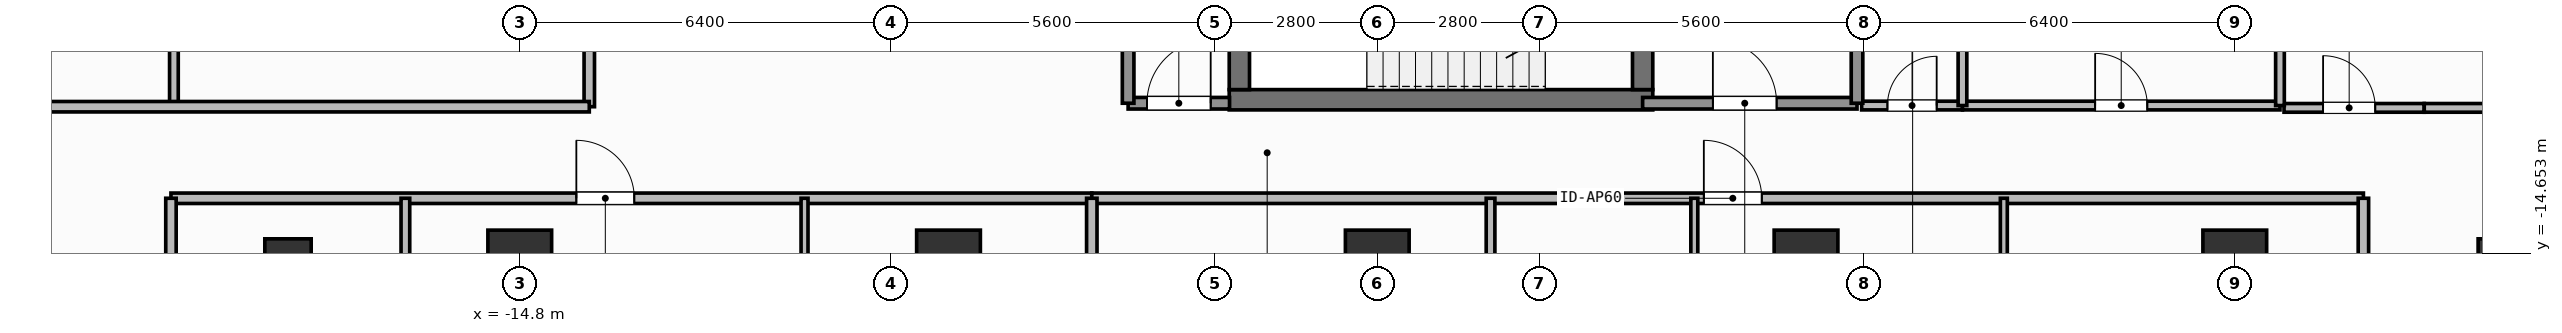
"""IFC4 building model, lengths in metres.
Left out: names, types, materials, properties, quantities, classifications, styles, units other than length and angle.
Written with IfcOpenShell. Run it as: python <this file> out.ifc"""

import sys

from ifc_helpers import new_model, si_unit, direction, frame, frame_2d, origin, origin_2d, place, context, subcontext, project, spatial, rectangle, hollow_rectangle, extrude, element, fill, save


model = new_model("IFC4")
c1 = context("Model", 3, precision=1e-05, world=origin(), true_north=direction((0.0, 1.0)))
c2 = subcontext(c1, "Body", "Model", "MODEL_VIEW")
j1 = project(units=[si_unit("LENGTHUNIT", "METRE"), si_unit("PLANEANGLEUNIT", "RADIAN")], contexts=[c1])
p1 = place(None, origin())
s1 = spatial("IfcSite", under=j1, at=p1, CompositionType="ELEMENT")
p2 = place(p1, origin())
s2 = spatial("IfcBuilding", under=s1, at=p2, CompositionType="ELEMENT")
p3 = place(p2, frame((0.0, 0.0, 195.3)))
s3 = spatial("IfcBuildingStorey", under=s2, at=p3, CompositionType="ELEMENT", Elevation=195.3)
p4 = place(p3, frame((-2.555, -12.0, 0.0), z_axis=(0.0, 0.0, 1.0), x_axis=(1.0, 0.0, 0.0)))
e1 = element("IfcWall", 1, at=p4, inside=s3, PredefinedType="SHEAR", context=c2, shape_type="SweptSolid", body=[
    extrude(rectangle(XDim=7.31, YDim=0.35, at=frame_2d((3.655, 0.0))), origin(), (0.0, 0.0, 1.0), 3.9),
])
p5 = place(p3, frame((-2.38, -11.825, 0.0), z_axis=(0.0, 0.0, 1.0), x_axis=(0.0, 1.0, 0.0)))
e2 = element("IfcWall", 2, at=p5, inside=s3, PredefinedType="SHEAR", context=c2, shape_type="SweptSolid", body=[
    extrude(rectangle(XDim=2.925, YDim=0.35, at=frame_2d((1.462, 0.0))), origin(), (0.0, 0.0, 1.0), 3.9),
])
p6 = place(p3, frame((4.58, -8.9, 0.0), z_axis=(0.0, 0.0, 1.0), x_axis=(0.0, -1.0, 0.0)))
e3 = element("IfcWall", 3, at=p6, inside=s3, PredefinedType="SHEAR", context=c2, shape_type="SweptSolid", body=[
    extrude(rectangle(XDim=2.925, YDim=0.35, at=frame_2d((1.462, 0.0))), origin(), (0.0, 0.0, 1.0), 3.9),
])
p7 = place(p6, frame((0.913, 0.0, 0.0)))
e4 = element("IfcOpeningElement", 4, at=p7, cuts=e3, PredefinedType="OPENING", context=c2, shape_type="SweptSolid", body=[
    extrude(rectangle(XDim=1.1, YDim=2.15, at=frame_2d((0.55, 1.075))), frame((0.0, 0.185, 0.0), z_axis=(0.0, -1.0, 0.0), x_axis=(1.0, 0.0, 0.0)), (0.0, 0.0, 1.0), 0.37),
])
for number, where, z_axis, x_axis in (
    (5, (-14.8, -14.8, 0.0), (0.0, 0.0, 1.0), (1.0, 0.0, 0.0)),
    (6, (-7.4, -14.8, 0.0), (0.0, 0.0, 1.0), (1.0, 0.0, 0.0)),
    (7, (0.0, -14.8, 0.0), (0.0, 0.0, 1.0), (1.0, 0.0, 0.0)),
    (8, (7.4, -14.8, 0.0), (0.0, 0.0, 1.0), (1.0, 0.0, 0.0)),
    (9, (14.8, -14.8, 0.0), (0.0, 0.0, 1.0), (1.0, 0.0, 0.0)),
):
    element("IfcColumn", number, at=place(p3, frame(where, z_axis=z_axis, x_axis=x_axis)), inside=s3, PredefinedType="COLUMN", context=c2, shape_type="SweptSolid", body=[
        extrude(rectangle(XDim=1.1, YDim=1.1, at=origin_2d()), origin(), (0.0, 0.0, 1.0), 3.9),
    ])
for number, where, z_axis, x_axis in (
    (10, (-18.8, -14.8, 0.0), (0.0, 0.0, 1.0), (1.0, 0.0, 0.0)),
    (11, (19.4, -14.8, 0.0), (0.0, 0.0, 1.0), (1.0, 0.0, 0.0)),
):
    element("IfcColumn", number, at=place(p3, frame(where, z_axis=z_axis, x_axis=x_axis)), inside=s3, PredefinedType="COLUMN", context=c2, shape_type="SweptSolid", body=[
        extrude(hollow_rectangle(XDim=0.8, YDim=0.8, WallThickness=0.036, at=origin_2d()), origin(), (0.0, 0.0, 1.0), 3.9),
    ])
p8 = place(p3, frame((4.58, -12.06, 0.0), z_axis=(0.0, 0.0, 1.0), x_axis=(1.0, 0.0, 0.0)))
e12 = element("IfcWall", 12, at=p8, inside=s3, PredefinedType="SOLIDWALL", context=c2, shape_type="SweptSolid", body=[
    extrude(rectangle(XDim=3.7, YDim=0.2, at=frame_2d((1.85, 0.0))), origin(), (0.0, 0.0, 1.0), 3.68),
])
p9 = place(p8, frame((1.212, 0.0, 0.0)))
e13 = element("IfcOpeningElement", 13, at=p9, cuts=e12, PredefinedType="OPENING", context=c2, shape_type="SweptSolid", body=[
    extrude(rectangle(XDim=1.1, YDim=2.15, at=frame_2d((0.55, 1.075))), frame((0.0, 0.11, 0.0), z_axis=(0.0, -1.0, 0.0), x_axis=(1.0, 0.0, 0.0)), (0.0, 0.0, 1.0), 0.22),
])
p10 = place(p3, frame((-4.3, -12.06, 0.0), z_axis=(0.0, 0.0, 1.0), x_axis=(1.0, 0.0, 0.0)))
e14 = element("IfcWall", 14, at=p10, inside=s3, PredefinedType="SOLIDWALL", context=c2, shape_type="SweptSolid", body=[
    extrude(rectangle(XDim=1.75, YDim=0.2, at=frame_2d((0.875, 0.0))), origin(), (0.0, 0.0, 1.0), 3.68),
])
p11 = place(p10, frame((0.325, 0.0, 0.0)))
e15 = element("IfcOpeningElement", 15, at=p11, cuts=e14, PredefinedType="OPENING", context=c2, shape_type="SweptSolid", body=[
    extrude(rectangle(XDim=1.1, YDim=2.15, at=frame_2d((0.55, 1.075))), frame((0.0, 0.11, 0.0), z_axis=(0.0, -1.0, 0.0), x_axis=(1.0, 0.0, 0.0)), (0.0, 0.0, 1.0), 0.22),
])
p12 = place(p3, frame((8.36, -12.1, 0.0), z_axis=(0.0, 0.0, 1.0), x_axis=(1.0, 0.0, 0.0)))
e16 = element("IfcWall", 16, at=p12, inside=s3, PredefinedType="PARTITIONING", context=c2, shape_type="SweptSolid", body=[
    extrude(rectangle(XDim=1.74, YDim=0.15, at=frame_2d((0.87, 0.0))), origin(), (0.0, 0.0, 1.0), 3.68),
])
p13 = place(p12, frame((0.445, 0.0, 0.0)))
e17 = element("IfcOpeningElement", 17, at=p13, cuts=e16, PredefinedType="OPENING", context=c2, shape_type="SweptSolid", body=[
    extrude(rectangle(XDim=0.85, YDim=2.1, at=frame_2d((0.425, 1.05))), frame((0.0, 0.085, 0.0), z_axis=(0.0, -1.0, 0.0), x_axis=(1.0, 0.0, 0.0)), (0.0, 0.0, 1.0), 0.17),
])
p14 = place(p3, frame((10.1, -12.1, 0.0), z_axis=(0.0, 0.0, 1.0), x_axis=(1.0, 0.0, 0.0)))
e18 = element("IfcWall", 18, at=p14, inside=s3, PredefinedType="PARTITIONING", context=c2, shape_type="SweptSolid", body=[
    extrude(rectangle(XDim=5.48, YDim=0.15, at=frame_2d((2.74, 0.0))), origin(), (0.0, 0.0, 1.0), 3.68),
])
p15 = place(p14, frame((2.29, 0.0, 0.0)))
e19 = element("IfcOpeningElement", 19, at=p15, cuts=e18, PredefinedType="OPENING", context=c2, shape_type="SweptSolid", body=[
    extrude(rectangle(XDim=0.9, YDim=2.1, at=frame_2d((0.45, 1.05))), frame((0.0, 0.085, 0.0), z_axis=(0.0, -1.0, 0.0), x_axis=(1.0, 0.0, 0.0)), (0.0, 0.0, 1.0), 0.17),
])
p16 = place(p3, frame((-20.82, -13.7, 0.0), z_axis=(0.0, 0.0, 1.0), x_axis=(1.0, 0.0, 0.0)))
e20 = element("IfcWall", 20, at=p16, inside=s3, PredefinedType="PARTITIONING", context=c2, shape_type="SweptSolid", body=[
    extrude(rectangle(XDim=15.893, YDim=0.18, at=frame_2d((7.947, 0.0))), origin(), (0.0, 0.0, 1.0), 3.68),
])
p17 = place(p16, frame((6.997, 0.0, 0.0)))
e21 = element("IfcOpeningElement", 21, at=p17, cuts=e20, PredefinedType="OPENING", context=c2, shape_type="SweptSolid", body=[
    extrude(rectangle(XDim=1.0, YDim=2.2, at=frame_2d((0.5, 1.1))), frame((0.0, 0.1, 0.0), z_axis=(0.0, -1.0, 0.0), x_axis=(1.0, 0.0, 0.0)), (0.0, 0.0, 1.0), 0.2),
])
p18 = place(p3, frame((-16.774, -24.39, 0.0), z_axis=(0.0, 0.0, 1.0), x_axis=(0.0, 1.0, 0.0)))
e22 = element("IfcWall", 22, at=p18, inside=s3, PredefinedType="PARTITIONING", context=c2, shape_type="SweptSolid", body=[
    extrude(rectangle(XDim=10.69, YDim=0.15, at=frame_2d((5.345, 0.0))), origin(), (0.0, 0.0, 1.0), 3.68),
])
p19 = place(p18, frame((4.83, 0.0, 0.0)))
e23 = element("IfcOpeningElement", 23, at=p19, cuts=e22, PredefinedType="OPENING", context=c2, shape_type="SweptSolid", body=[
    extrude(rectangle(XDim=0.85, YDim=2.1, at=frame_2d((0.425, 1.05))), frame((0.0, 0.085, 0.0), z_axis=(0.0, -1.0, 0.0), x_axis=(1.0, 0.0, 0.0)), (0.0, 0.0, 1.0), 0.17),
])
p20 = place(p3, frame((-9.885, -18.19, 0.0), z_axis=(0.0, 0.0, 1.0), x_axis=(0.0, 1.0, 0.0)))
e24 = element("IfcWall", 24, at=p20, inside=s3, PredefinedType="PARTITIONING", context=c2, shape_type="SweptSolid", body=[
    extrude(rectangle(XDim=4.49, YDim=0.12, at=frame_2d((2.245, 0.0))), origin(), (0.0, 0.0, 1.0), 3.68),
])
p21 = place(p20, frame((1.907, 0.0, 0.0)))
e25 = element("IfcOpeningElement", 25, at=p21, cuts=e24, PredefinedType="OPENING", context=c2, shape_type="SweptSolid", body=[
    extrude(rectangle(XDim=0.85, YDim=2.1, at=frame_2d((0.425, 1.05))), frame((0.0, 0.07, 0.0), z_axis=(0.0, -1.0, 0.0), x_axis=(1.0, 0.0, 0.0)), (0.0, 0.0, 1.0), 0.14),
])
p22 = place(p3, frame((-4.927, -13.7, 0.0), z_axis=(0.0, 0.0, 1.0), x_axis=(1.0, 0.0, 0.0)))
e26 = element("IfcWall", 26, at=p22, inside=s3, PredefinedType="PARTITIONING", context=c2, shape_type="SweptSolid", body=[
    extrude(rectangle(XDim=21.947, YDim=0.18, at=frame_2d((10.974, 0.0))), origin(), (0.0, 0.0, 1.0), 3.68),
])
p23 = place(p22, frame((10.563, 0.0, 0.0)))
e27 = element("IfcOpeningElement", 27, at=p23, cuts=e26, PredefinedType="OPENING", context=c2, shape_type="SweptSolid", body=[
    extrude(rectangle(XDim=1.0, YDim=2.2, at=frame_2d((0.5, 1.1))), frame((0.0, 0.1, 0.0), z_axis=(0.0, -1.0, 0.0), x_axis=(1.0, 0.0, 0.0)), (0.0, 0.0, 1.0), 0.2),
])
p24 = place(p3, frame((5.472, -24.39, 0.0), z_axis=(0.0, 0.0, 1.0), x_axis=(0.0, 1.0, 0.0)))
e28 = element("IfcWall", 28, at=p24, inside=s3, PredefinedType="PARTITIONING", context=c2, shape_type="SweptSolid", body=[
    extrude(rectangle(XDim=10.69, YDim=0.12, at=frame_2d((5.345, 0.0))), origin(), (0.0, 0.0, 1.0), 3.68),
])
p25 = place(p24, frame((4.806, 0.0, 0.0)))
e29 = element("IfcOpeningElement", 29, at=p25, cuts=e28, PredefinedType="OPENING", context=c2, shape_type="SweptSolid", body=[
    extrude(rectangle(XDim=0.9, YDim=2.1, at=frame_2d((0.45, 1.05))), frame((0.0, 0.07, 0.0), z_axis=(0.0, -1.0, 0.0), x_axis=(1.0, 0.0, 0.0)), (0.0, 0.0, 1.0), 0.14),
])
p26 = place(p3, frame((1.955, -19.45, 0.0), z_axis=(0.0, 0.0, 1.0), x_axis=(0.0, 1.0, 0.0)))
e30 = element("IfcWall", 30, at=p26, inside=s3, PredefinedType="PARTITIONING", context=c2, shape_type="SweptSolid", body=[
    extrude(rectangle(XDim=5.75, YDim=0.15, at=frame_2d((2.875, 0.0))), origin(), (0.0, 0.0, 1.0), 3.68),
])
p27 = place(p26, frame((2.45, 0.0, 0.0)))
e31 = element("IfcOpeningElement", 31, at=p27, cuts=e30, PredefinedType="OPENING", context=c2, shape_type="SweptSolid", body=[
    extrude(rectangle(XDim=0.85, YDim=2.1, at=frame_2d((0.425, 1.05))), frame((0.0, 0.085, 0.0), z_axis=(0.0, -1.0, 0.0), x_axis=(1.0, 0.0, 0.0)), (0.0, 0.0, 1.0), 0.17),
])
p28 = place(p3, frame((10.814, -18.19, 0.0), z_axis=(0.0, 0.0, 1.0), x_axis=(0.0, 1.0, 0.0)))
e32 = element("IfcWall", 32, at=p28, inside=s3, PredefinedType="PARTITIONING", context=c2, shape_type="SweptSolid", body=[
    extrude(rectangle(XDim=4.49, YDim=0.12, at=frame_2d((2.245, 0.0))), origin(), (0.0, 0.0, 1.0), 3.68),
])
p29 = place(p28, frame((1.907, 0.0, 0.0)))
e33 = element("IfcOpeningElement", 33, at=p29, cuts=e32, PredefinedType="OPENING", context=c2, shape_type="SweptSolid", body=[
    extrude(rectangle(XDim=0.85, YDim=2.1, at=frame_2d((0.425, 1.05))), frame((0.0, 0.07, 0.0), z_axis=(0.0, -1.0, 0.0), x_axis=(1.0, 0.0, 0.0)), (0.0, 0.0, 1.0), 0.14),
])
p30 = place(p3, frame((-13.6, -12.12, 0.0), z_axis=(0.0, 0.0, 1.0), x_axis=(0.0, 1.0, 0.0)))
e34 = element("IfcWall", 34, at=p30, inside=s3, PredefinedType="PARTITIONING", context=c2, shape_type="SweptSolid", body=[
    extrude(rectangle(XDim=12.764, YDim=0.18, at=frame_2d((6.382, 0.0))), origin(), (0.0, 0.0, 1.0), 3.68),
])
p31 = place(p30, frame((5.346, 0.0, 0.0)))
e35 = element("IfcOpeningElement", 35, at=p31, cuts=e34, PredefinedType="OPENING", context=c2, shape_type="SweptSolid", body=[
    extrude(rectangle(XDim=1.0, YDim=2.2, at=frame_2d((0.5, 1.1))), frame((0.0, 0.1, 0.0), z_axis=(0.0, -1.0, 0.0), x_axis=(1.0, 0.0, 0.0)), (0.0, 0.0, 1.0), 0.2),
])
p32 = place(p3, frame((15.65, -12.14, 0.0), z_axis=(0.0, 0.0, 1.0), x_axis=(1.0, 0.0, 0.0)))
e36 = element("IfcWall", 36, at=p32, inside=s3, PredefinedType="PARTITIONING", context=c2, shape_type="SweptSolid", body=[
    extrude(rectangle(XDim=2.42, YDim=0.15, at=frame_2d((1.21, 0.0))), origin(), (0.0, 0.0, 1.0), 3.68),
])
p33 = place(p32, frame((0.674, 0.0, 0.0)))
e37 = element("IfcOpeningElement", 37, at=p33, cuts=e36, PredefinedType="OPENING", context=c2, shape_type="SweptSolid", body=[
    extrude(rectangle(XDim=0.9, YDim=2.1, at=frame_2d((0.45, 1.05))), frame((0.0, 0.085, 0.0), z_axis=(0.0, -1.0, 0.0), x_axis=(1.0, 0.0, 0.0)), (0.0, 0.0, 1.0), 0.17),
])
for number, where, z_axis, x_axis in (
    (38, (8.28, -12.06, 0.0), (0.0, 0.0, 1.0), (0.0, 1.0, 0.0)),
    (39, (-4.3, -12.06, 0.0), (0.0, 0.0, 1.0), (0.0, 1.0, 0.0)),
):
    element("IfcWall", number, at=place(p3, frame(where, z_axis=z_axis, x_axis=x_axis)), inside=s3, PredefinedType="SOLIDWALL", context=c2, shape_type="SweptSolid", body=[
        extrude(rectangle(XDim=3.26, YDim=0.2, at=frame_2d((1.63, 0.0))), origin(), (0.0, 0.0, 1.0), 3.68),
    ])
p34 = place(p3, frame((10.1, -12.1, 0.0), z_axis=(0.0, 0.0, 1.0), x_axis=(0.0, 1.0, 0.0)))
e40 = element("IfcWall", 40, at=p34, inside=s3, PredefinedType="PARTITIONING", context=c2, shape_type="SweptSolid", body=[
    extrude(rectangle(XDim=2.35, YDim=0.15, at=frame_2d((1.175, 0.0))), origin(), (0.0, 0.0, 1.0), 3.68),
])
p35 = place(p3, frame((15.58, -12.1, 0.0), z_axis=(0.0, 0.0, 1.0), x_axis=(0.0, 1.0, 0.0)))
e41 = element("IfcWall", 41, at=p35, inside=s3, PredefinedType="PARTITIONING", context=c2, shape_type="SweptSolid", body=[
    extrude(rectangle(XDim=6.25, YDim=0.15, at=frame_2d((3.125, 0.0))), origin(), (0.0, 0.0, 1.0), 3.68),
])
p36 = place(p3, frame((-4.927, -28.63, 0.0), z_axis=(0.0, 0.0, 1.0), x_axis=(0.0, 1.0, 0.0)))
e42 = element("IfcWall", 42, at=p36, inside=s3, PredefinedType="PARTITIONING", context=c2, shape_type="SweptSolid", body=[
    extrude(rectangle(XDim=14.93, YDim=0.18, at=frame_2d((7.465, 0.0))), origin(), (0.0, 0.0, 1.0), 3.68),
])
for number, where, z_axis, x_axis in (
    (43, (-20.82, -27.51, 0.0), (0.0, 0.0, 1.0), (0.0, 1.0, 0.0)),
    (44, (17.02, -27.51, 0.0), (0.0, 0.0, 1.0), (0.0, 1.0, 0.0)),
):
    element("IfcWall", number, at=place(p3, frame(where, z_axis=z_axis, x_axis=x_axis)), inside=s3, PredefinedType="PARTITIONING", context=c2, shape_type="SweptSolid", body=[
        extrude(rectangle(XDim=13.81, YDim=0.18, at=frame_2d((6.905, 0.0))), origin(), (0.0, 0.0, 1.0), 3.68),
    ])
p37 = place(p3, frame((-20.769, -12.12, 0.0), z_axis=(0.0, 0.0, 1.0), x_axis=(0.0, 1.0, 0.0)))
e45 = element("IfcWall", 45, at=p37, inside=s3, PredefinedType="PARTITIONING", context=c2, shape_type="SweptSolid", body=[
    extrude(rectangle(XDim=3.284, YDim=0.15, at=frame_2d((1.642, 0.0))), origin(), (0.0, 0.0, 1.0), 3.68),
])
p38 = place(p3, frame((-24.13, -12.12, 0.0), z_axis=(0.0, 0.0, 1.0), x_axis=(1.0, 0.0, 0.0)))
e46 = element("IfcWall", 46, at=p38, inside=s3, PredefinedType="PARTITIONING", context=c2, shape_type="SweptSolid", body=[
    extrude(rectangle(XDim=10.53, YDim=0.18, at=frame_2d((5.265, 0.0))), origin(), (0.0, 0.0, 1.0), 3.68),
])
p39 = place(p3, frame((18.07, -12.14, 0.0), z_axis=(0.0, 0.0, 1.0), x_axis=(1.0, 0.0, 0.0)))
e47 = element("IfcWall", 47, at=p39, inside=s3, PredefinedType="PARTITIONING", context=c2, shape_type="SweptSolid", body=[
    extrude(rectangle(XDim=2.26, YDim=0.15, at=frame_2d((1.13, 0.0))), origin(), (0.0, 0.0, 1.0), 3.68),
])
p40 = place(p9, origin())
e48 = element("IfcDoor", 48, at=p40, inside=s3, OperationType="SINGLE_SWING_LEFT", PredefinedType="DOOR", context=c2, shape_type="SweptSolid", body=[
    extrude(rectangle(XDim=1.1, YDim=2.15, at=frame_2d((0.55, 1.075))), frame((0.0, 0.025, 0.0), z_axis=(0.0, -1.0, 0.0), x_axis=(1.0, 0.0, 0.0)), (0.0, 0.0, 1.0), 0.05),
])
fill(e13, e48)
p41 = place(p11, origin())
e49 = element("IfcDoor", 49, at=p41, inside=s3, OperationType="SINGLE_SWING_RIGHT", PredefinedType="DOOR", context=c2, shape_type="SweptSolid", body=[
    extrude(rectangle(XDim=1.1, YDim=2.15, at=frame_2d((0.55, 1.075))), frame((0.0, 0.025, 0.0), z_axis=(0.0, -1.0, 0.0), x_axis=(1.0, 0.0, 0.0)), (0.0, 0.0, 1.0), 0.05),
])
fill(e15, e49)
p42 = place(p13, origin())
e50 = element("IfcDoor", 50, at=p42, inside=s3, OperationType="SINGLE_SWING_RIGHT", PredefinedType="DOOR", context=c2, shape_type="SweptSolid", body=[
    extrude(rectangle(XDim=0.85, YDim=2.1, at=frame_2d((0.425, 1.05))), frame((0.0, 0.025, 0.0), z_axis=(0.0, -1.0, 0.0), x_axis=(1.0, 0.0, 0.0)), (0.0, 0.0, 1.0), 0.05),
])
fill(e17, e50)
p43 = place(p15, origin())
e51 = element("IfcDoor", 51, at=p43, inside=s3, OperationType="SINGLE_SWING_LEFT", PredefinedType="DOOR", context=c2, shape_type="SweptSolid", body=[
    extrude(rectangle(XDim=0.9, YDim=2.1, at=frame_2d((0.45, 1.05))), frame((0.0, 0.025, 0.0), z_axis=(0.0, -1.0, 0.0), x_axis=(1.0, 0.0, 0.0)), (0.0, 0.0, 1.0), 0.05),
])
fill(e19, e51)
p44 = place(p17, origin())
e52 = element("IfcDoor", 52, at=p44, inside=s3, OperationType="SINGLE_SWING_LEFT", PredefinedType="DOOR", context=c2, shape_type="SweptSolid", body=[
    extrude(rectangle(XDim=1.0, YDim=2.2, at=frame_2d((0.5, 1.1))), frame((0.0, 0.025, 0.0), z_axis=(0.0, -1.0, 0.0), x_axis=(1.0, 0.0, 0.0)), (0.0, 0.0, 1.0), 0.05),
])
fill(e21, e52)
p45 = place(p23, origin())
e53 = element("IfcDoor", 53, at=p45, inside=s3, OperationType="SINGLE_SWING_LEFT", PredefinedType="DOOR", context=c2, shape_type="SweptSolid", body=[
    extrude(rectangle(XDim=1.0, YDim=2.2, at=frame_2d((0.5, 1.1))), frame((0.0, 0.025, 0.0), z_axis=(0.0, -1.0, 0.0), x_axis=(1.0, 0.0, 0.0)), (0.0, 0.0, 1.0), 0.05),
])
fill(e27, e53)
p46 = place(p33, origin())
e54 = element("IfcDoor", 54, at=p46, inside=s3, OperationType="SINGLE_SWING_LEFT", PredefinedType="DOOR", context=c2, shape_type="SweptSolid", body=[
    extrude(rectangle(XDim=0.9, YDim=2.1, at=frame_2d((0.45, 1.05))), frame((0.0, 0.025, 0.0), z_axis=(0.0, -1.0, 0.0), x_axis=(1.0, 0.0, 0.0)), (0.0, 0.0, 1.0), 0.05),
])
fill(e37, e54)
save(model, sys.argv[1])
